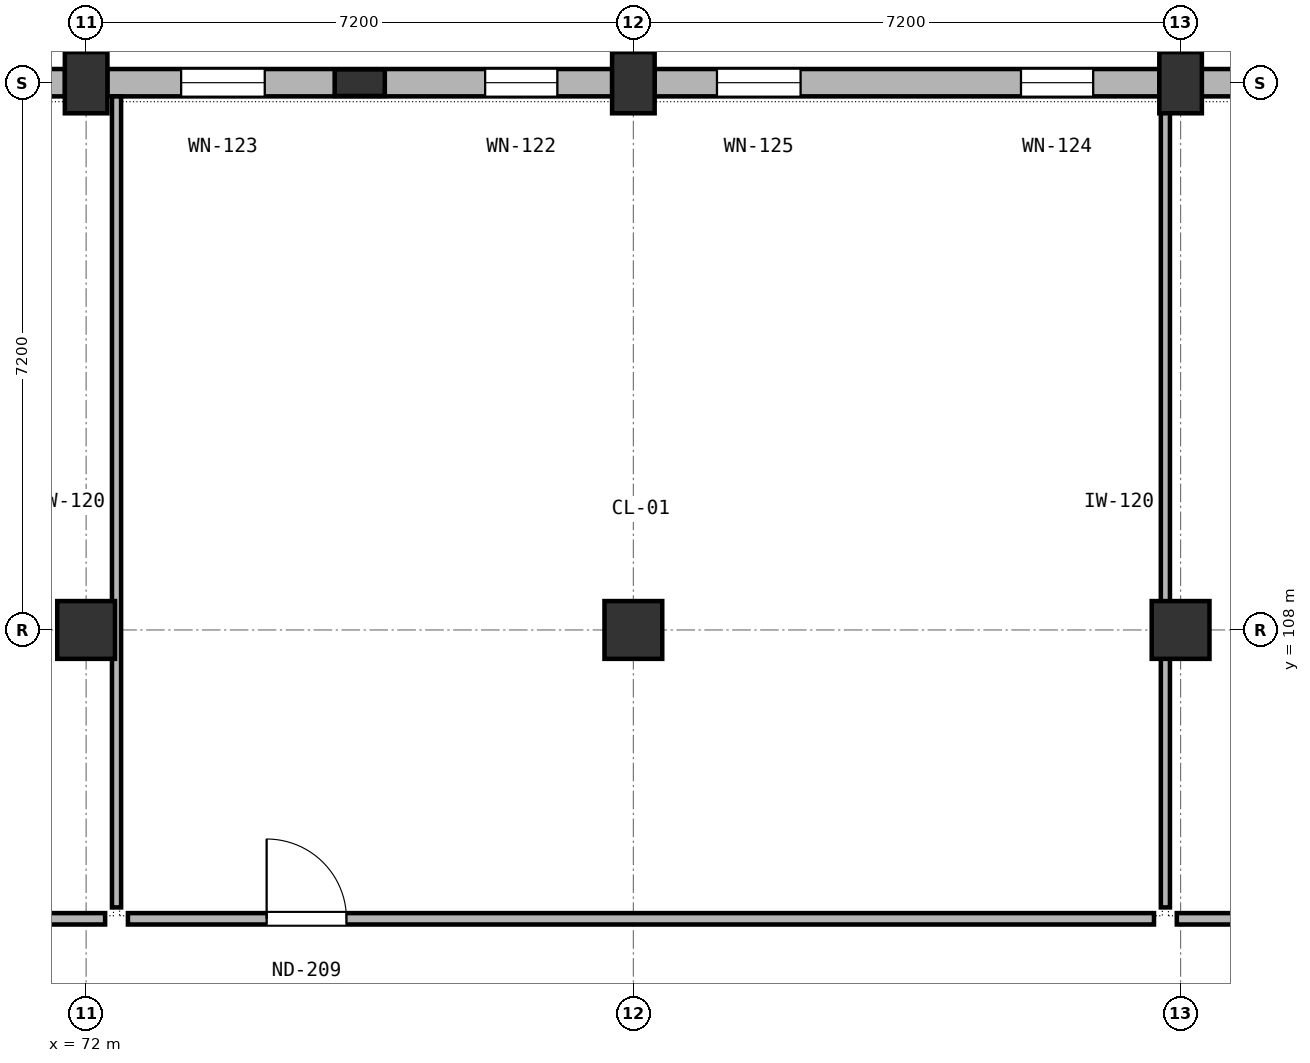
"""IFC4 building model, lengths in metres.
Left out: names, types, materials, properties, quantities, classifications, styles, units other than length and angle.
Written with IfcOpenShell. Run it as: python <this file> out.ifc"""

import sys

from ifc_helpers import new_model, si_unit, direction, frame, frame_2d, origin, origin_2d, place, context, subcontext, project, spatial, rectangle, extrude, element, fill, save


model = new_model("IFC4")
c1 = context("Model", 3, precision=1e-05, world=origin(), true_north=direction((0.0, 1.0)))
c2 = subcontext(c1, "Body", "Model", "MODEL_VIEW")
j1 = project(units=[si_unit("LENGTHUNIT", "METRE"), si_unit("PLANEANGLEUNIT", "RADIAN")], contexts=[c1])
p1 = place(None, origin())
s1 = spatial("IfcSite", under=j1, at=p1, CompositionType="ELEMENT")
p2 = place(p1, origin())
s2 = spatial("IfcBuilding", under=s1, at=p2, CompositionType="ELEMENT")
p3 = place(p2, frame((0.0, 0.0, 18.6)))
s3 = spatial("IfcBuildingStorey", under=s2, at=p3, CompositionType="ELEMENT", Elevation=18.6)
p4 = place(p3, frame((72.0, 108.0, 0.0), z_axis=(0.0, 0.0, 1.0), x_axis=(1.0, 0.0, 0.0)))
e1 = element("IfcColumn", 1, at=p4, inside=s3, PredefinedType="COLUMN", context=c2, shape_type="SweptSolid", body=[
    extrude(rectangle(XDim=0.76, YDim=0.76, at=origin_2d()), origin(), (0.0, 0.0, 1.0), 3.9),
])
p5 = place(p3, frame((72.0, 115.2, 0.0), z_axis=(0.0, 0.0, 1.0), x_axis=(1.0, 0.0, 0.0)))
e2 = element("IfcColumn", 2, at=p5, inside=s3, PredefinedType="COLUMN", context=c2, shape_type="SweptSolid", body=[
    extrude(rectangle(XDim=0.56, YDim=0.805, at=origin_2d()), origin(), (0.0, 0.0, 1.0), 3.9),
])
p6 = place(p3, frame((79.2, 108.0, 0.0), z_axis=(0.0, 0.0, 1.0), x_axis=(1.0, 0.0, 0.0)))
e3 = element("IfcColumn", 3, at=p6, inside=s3, PredefinedType="COLUMN", context=c2, shape_type="SweptSolid", body=[
    extrude(rectangle(XDim=0.76, YDim=0.76, at=origin_2d()), origin(), (0.0, 0.0, 1.0), 3.9),
])
p7 = place(p3, frame((79.2, 115.2, 0.0), z_axis=(0.0, 0.0, 1.0), x_axis=(1.0, 0.0, 0.0)))
e4 = element("IfcColumn", 4, at=p7, inside=s3, PredefinedType="COLUMN", context=c2, shape_type="SweptSolid", body=[
    extrude(rectangle(XDim=0.56, YDim=0.805, at=origin_2d()), origin(), (0.0, 0.0, 1.0), 3.9),
])
p8 = place(p3, frame((86.4, 108.0, 0.0), z_axis=(0.0, 0.0, 1.0), x_axis=(1.0, 0.0, 0.0)))
e5 = element("IfcColumn", 5, at=p8, inside=s3, PredefinedType="COLUMN", context=c2, shape_type="SweptSolid", body=[
    extrude(rectangle(XDim=0.76, YDim=0.76, at=origin_2d()), origin(), (0.0, 0.0, 1.0), 3.9),
])
p9 = place(p3, frame((86.4, 115.2, 0.0), z_axis=(0.0, 0.0, 1.0), x_axis=(1.0, 0.0, 0.0)))
e6 = element("IfcColumn", 6, at=p9, inside=s3, PredefinedType="COLUMN", context=c2, shape_type="SweptSolid", body=[
    extrude(rectangle(XDim=0.56, YDim=0.805, at=origin_2d()), origin(), (0.0, 0.0, 1.0), 3.9),
])
p10 = place(p3, frame((75.6, 115.2, 0.0), z_axis=(0.0, 0.0, 1.0), x_axis=(1.0, 0.0, 0.0)))
e7 = element("IfcColumn", 7, at=p10, inside=s3, PredefinedType="PILASTER", context=c2, shape_type="SweptSolid", body=[
    extrude(rectangle(XDim=0.66, YDim=0.35, at=origin_2d()), origin(), (0.0, 0.0, 1.0), 3.9),
])
p11 = place(p3, frame((71.722, 115.2, 0.0), z_axis=(0.0, 0.0, 1.0), x_axis=(-1.0, 0.0, 0.0)))
e8 = element("IfcWall", 8, at=p11, inside=s3, PredefinedType="SOLIDWALL", context=c2, shape_type="SweptSolid", body=[
    extrude(rectangle(XDim=6.644, YDim=0.36, at=frame_2d((3.322, 0.0))), origin(), (0.0, 0.0, 1.0), 2.74),
])
p12 = place(p11, frame((0.872, 0.0, 0.7)))
e9 = element("IfcOpeningElement", 9, at=p12, cuts=e8, PredefinedType="OPENING", context=c2, shape_type="SweptSolid", body=[
    extrude(rectangle(XDim=0.95, YDim=1.84, at=frame_2d((0.475, 0.92))), frame((0.0, 0.19, 0.0), z_axis=(0.0, -1.0, 0.0), x_axis=(1.0, 0.0, 0.0)), (0.0, 0.0, 1.0), 0.38),
])
p13 = place(p11, frame((4.722, 0.0, 0.7)))
e10 = element("IfcOpeningElement", 10, at=p13, cuts=e8, PredefinedType="OPENING", context=c2, shape_type="SweptSolid", body=[
    extrude(rectangle(XDim=1.1, YDim=1.84, at=frame_2d((0.55, 0.92))), frame((0.0, 0.19, 0.0), z_axis=(0.0, -1.0, 0.0), x_axis=(1.0, 0.0, 0.0)), (0.0, 0.0, 1.0), 0.38),
])
p14 = place(p3, frame((78.922, 115.2, 0.0), z_axis=(0.0, 0.0, 1.0), x_axis=(-1.0, 0.0, 0.0)))
e11 = element("IfcWall", 11, at=p14, inside=s3, PredefinedType="SOLIDWALL", context=c2, shape_type="SweptSolid", body=[
    extrude(rectangle(XDim=6.644, YDim=0.36, at=frame_2d((3.322, 0.0))), origin(), (0.0, 0.0, 1.0), 2.74),
])
p15 = place(p14, frame((0.722, 0.0, 0.7)))
e12 = element("IfcOpeningElement", 12, at=p15, cuts=e11, PredefinedType="OPENING", context=c2, shape_type="SweptSolid", body=[
    extrude(rectangle(XDim=0.95, YDim=1.84, at=frame_2d((0.475, 0.92))), frame((0.0, 0.19, 0.0), z_axis=(0.0, -1.0, 0.0), x_axis=(1.0, 0.0, 0.0)), (0.0, 0.0, 1.0), 0.38),
])
p16 = place(p14, frame((4.572, 0.0, 0.7)))
e13 = element("IfcOpeningElement", 13, at=p16, cuts=e11, PredefinedType="OPENING", context=c2, shape_type="SweptSolid", body=[
    extrude(rectangle(XDim=1.1, YDim=1.84, at=frame_2d((0.55, 0.92))), frame((0.0, 0.19, 0.0), z_axis=(0.0, -1.0, 0.0), x_axis=(1.0, 0.0, 0.0)), (0.0, 0.0, 1.0), 0.38),
])
p17 = place(p3, frame((86.122, 115.2, 0.0), z_axis=(0.0, 0.0, 1.0), x_axis=(-1.0, 0.0, 0.0)))
e14 = element("IfcWall", 14, at=p17, inside=s3, PredefinedType="SOLIDWALL", context=c2, shape_type="SweptSolid", body=[
    extrude(rectangle(XDim=6.644, YDim=0.36, at=frame_2d((3.322, 0.0))), origin(), (0.0, 0.0, 1.0), 2.74),
])
p18 = place(p17, frame((0.872, 0.0, 0.7)))
e15 = element("IfcOpeningElement", 15, at=p18, cuts=e14, PredefinedType="OPENING", context=c2, shape_type="SweptSolid", body=[
    extrude(rectangle(XDim=0.95, YDim=1.84, at=frame_2d((0.475, 0.92))), frame((0.0, 0.19, 0.0), z_axis=(0.0, -1.0, 0.0), x_axis=(1.0, 0.0, 0.0)), (0.0, 0.0, 1.0), 0.38),
])
p19 = place(p17, frame((4.722, 0.0, 0.7)))
e16 = element("IfcOpeningElement", 16, at=p19, cuts=e14, PredefinedType="OPENING", context=c2, shape_type="SweptSolid", body=[
    extrude(rectangle(XDim=1.1, YDim=1.84, at=frame_2d((0.55, 0.92))), frame((0.0, 0.19, 0.0), z_axis=(0.0, -1.0, 0.0), x_axis=(1.0, 0.0, 0.0)), (0.0, 0.0, 1.0), 0.38),
])
p20 = place(p3, frame((93.322, 115.2, 0.0), z_axis=(0.0, 0.0, 1.0), x_axis=(-1.0, 0.0, 0.0)))
e17 = element("IfcWall", 17, at=p20, inside=s3, PredefinedType="SOLIDWALL", context=c2, shape_type="SweptSolid", body=[
    extrude(rectangle(XDim=6.644, YDim=0.36, at=frame_2d((3.322, 0.0))), origin(), (0.0, 0.0, 1.0), 2.74),
])
p21 = place(p20, frame((0.722, 0.0, 0.7)))
e18 = element("IfcOpeningElement", 18, at=p21, cuts=e17, PredefinedType="OPENING", context=c2, shape_type="SweptSolid", body=[
    extrude(rectangle(XDim=0.95, YDim=1.84, at=frame_2d((0.475, 0.92))), frame((0.0, 0.19, 0.0), z_axis=(0.0, -1.0, 0.0), x_axis=(1.0, 0.0, 0.0)), (0.0, 0.0, 1.0), 0.38),
])
p22 = place(p20, frame((4.572, 0.0, 0.7)))
e19 = element("IfcOpeningElement", 19, at=p22, cuts=e17, PredefinedType="OPENING", context=c2, shape_type="SweptSolid", body=[
    extrude(rectangle(XDim=1.1, YDim=1.84, at=frame_2d((0.55, 0.92))), frame((0.0, 0.19, 0.0), z_axis=(0.0, -1.0, 0.0), x_axis=(1.0, 0.0, 0.0)), (0.0, 0.0, 1.0), 0.38),
])
p23 = place(p3, frame((59.15, 104.2, 0.0), z_axis=(0.0, 0.0, 1.0), x_axis=(1.0, 0.0, 0.0)))
e20 = element("IfcWall", 20, at=p23, inside=s3, PredefinedType="PARTITIONING", context=c2, shape_type="SweptSolid", body=[
    extrude(rectangle(XDim=13.1, YDim=0.15, at=frame_2d((6.55, 0.0))), origin(), (0.0, 0.0, 1.0), 2.78),
])
p24 = place(p23, frame((1.65, 0.0, 0.0)))
e21 = element("IfcOpeningElement", 21, at=p24, cuts=e20, PredefinedType="OPENING", context=c2, shape_type="SweptSolid", body=[
    extrude(rectangle(XDim=1.4, YDim=2.2, at=frame_2d((0.7, 1.1))), frame((0.0, 0.085, 0.0), z_axis=(0.0, -1.0, 0.0), x_axis=(1.0, 0.0, 0.0)), (0.0, 0.0, 1.0), 0.17),
])
p25 = place(p3, frame((72.55, 104.2, 0.0), z_axis=(0.0, 0.0, 1.0), x_axis=(1.0, 0.0, 0.0)))
e22 = element("IfcWall", 22, at=p25, inside=s3, PredefinedType="PARTITIONING", context=c2, shape_type="SweptSolid", body=[
    extrude(rectangle(XDim=13.5, YDim=0.15, at=frame_2d((6.75, 0.0))), origin(), (0.0, 0.0, 1.0), 2.78),
])
p26 = place(p25, frame((1.825, 0.0, 0.0)))
e23 = element("IfcOpeningElement", 23, at=p26, cuts=e22, PredefinedType="OPENING", context=c2, shape_type="SweptSolid", body=[
    extrude(rectangle(XDim=1.05, YDim=2.15, at=frame_2d((0.525, 1.075))), frame((0.0, 0.085, 0.0), z_axis=(0.0, -1.0, 0.0), x_axis=(1.0, 0.0, 0.0)), (0.0, 0.0, 1.0), 0.17),
])
p27 = place(p3, frame((72.4, 104.35, 0.0), z_axis=(0.0, 0.0, 1.0), x_axis=(0.0, 1.0, 0.0)))
e24 = element("IfcWall", 24, at=p27, inside=s3, PredefinedType="PARTITIONING", context=c2, shape_type="SweptSolid", body=[
    extrude(rectangle(XDim=10.67, YDim=0.12, at=frame_2d((5.335, 0.0))), origin(), (0.0, 0.0, 1.0), 2.78),
])
p28 = place(p3, frame((86.35, 104.2, 0.0), z_axis=(0.0, 0.0, 1.0), x_axis=(1.0, 0.0, 0.0)))
e25 = element("IfcWall", 25, at=p28, inside=s3, PredefinedType="PARTITIONING", context=c2, shape_type="SweptSolid", body=[
    extrude(rectangle(XDim=7.3, YDim=0.15, at=frame_2d((3.65, 0.0))), origin(), (0.0, 0.0, 1.0), 2.78),
])
p29 = place(p28, frame((3.15, 0.0, 0.0)))
e26 = element("IfcOpeningElement", 26, at=p29, cuts=e25, PredefinedType="OPENING", context=c2, shape_type="SweptSolid", body=[
    extrude(rectangle(XDim=1.0, YDim=2.15, at=frame_2d((0.5, 1.075))), frame((0.0, 0.085, 0.0), z_axis=(0.0, -1.0, 0.0), x_axis=(1.0, 0.0, 0.0)), (0.0, 0.0, 1.0), 0.17),
])
p30 = place(p3, frame((86.2, 104.35, 0.0), z_axis=(0.0, 0.0, 1.0), x_axis=(0.0, 1.0, 0.0)))
e27 = element("IfcWall", 27, at=p30, inside=s3, PredefinedType="PARTITIONING", context=c2, shape_type="SweptSolid", body=[
    extrude(rectangle(XDim=10.67, YDim=0.12, at=frame_2d((5.335, 0.0))), origin(), (0.0, 0.0, 1.0), 2.78),
])
p31 = place(p15, origin())
e28 = element("IfcWindow", 28, at=p31, inside=s3, PartitioningType="SINGLE_PANEL", PredefinedType="WINDOW", context=c2, shape_type="SweptSolid", body=[
    extrude(rectangle(XDim=0.95, YDim=1.84, at=frame_2d((0.475, 0.92))), frame((0.0, 0.03, 0.0), z_axis=(0.0, -1.0, 0.0), x_axis=(1.0, 0.0, 0.0)), (0.0, 0.0, 1.0), 0.06),
])
fill(e12, e28)
p32 = place(p16, origin())
e29 = element("IfcWindow", 29, at=p32, inside=s3, PartitioningType="SINGLE_PANEL", PredefinedType="WINDOW", context=c2, shape_type="SweptSolid", body=[
    extrude(rectangle(XDim=1.1, YDim=1.84, at=frame_2d((0.55, 0.92))), frame((0.0, 0.03, 0.0), z_axis=(0.0, -1.0, 0.0), x_axis=(1.0, 0.0, 0.0)), (0.0, 0.0, 1.0), 0.06),
])
fill(e13, e29)
p33 = place(p18, origin())
e30 = element("IfcWindow", 30, at=p33, inside=s3, PartitioningType="SINGLE_PANEL", PredefinedType="WINDOW", context=c2, shape_type="SweptSolid", body=[
    extrude(rectangle(XDim=0.95, YDim=1.84, at=frame_2d((0.475, 0.92))), frame((0.0, 0.03, 0.0), z_axis=(0.0, -1.0, 0.0), x_axis=(1.0, 0.0, 0.0)), (0.0, 0.0, 1.0), 0.06),
])
fill(e15, e30)
p34 = place(p19, origin())
e31 = element("IfcWindow", 31, at=p34, inside=s3, PartitioningType="SINGLE_PANEL", PredefinedType="WINDOW", context=c2, shape_type="SweptSolid", body=[
    extrude(rectangle(XDim=1.1, YDim=1.84, at=frame_2d((0.55, 0.92))), frame((0.0, 0.03, 0.0), z_axis=(0.0, -1.0, 0.0), x_axis=(1.0, 0.0, 0.0)), (0.0, 0.0, 1.0), 0.06),
])
fill(e16, e31)
p35 = place(p26, origin())
e32 = element("IfcDoor", 32, at=p35, inside=s3, OperationType="SINGLE_SWING_LEFT", PredefinedType="DOOR", context=c2, shape_type="SweptSolid", body=[
    extrude(rectangle(XDim=1.05, YDim=2.15, at=frame_2d((0.525, 1.075))), frame((0.0, 0.025, 0.0), z_axis=(0.0, -1.0, 0.0), x_axis=(1.0, 0.0, 0.0)), (0.0, 0.0, 1.0), 0.05),
])
fill(e23, e32)
save(model, sys.argv[1])
